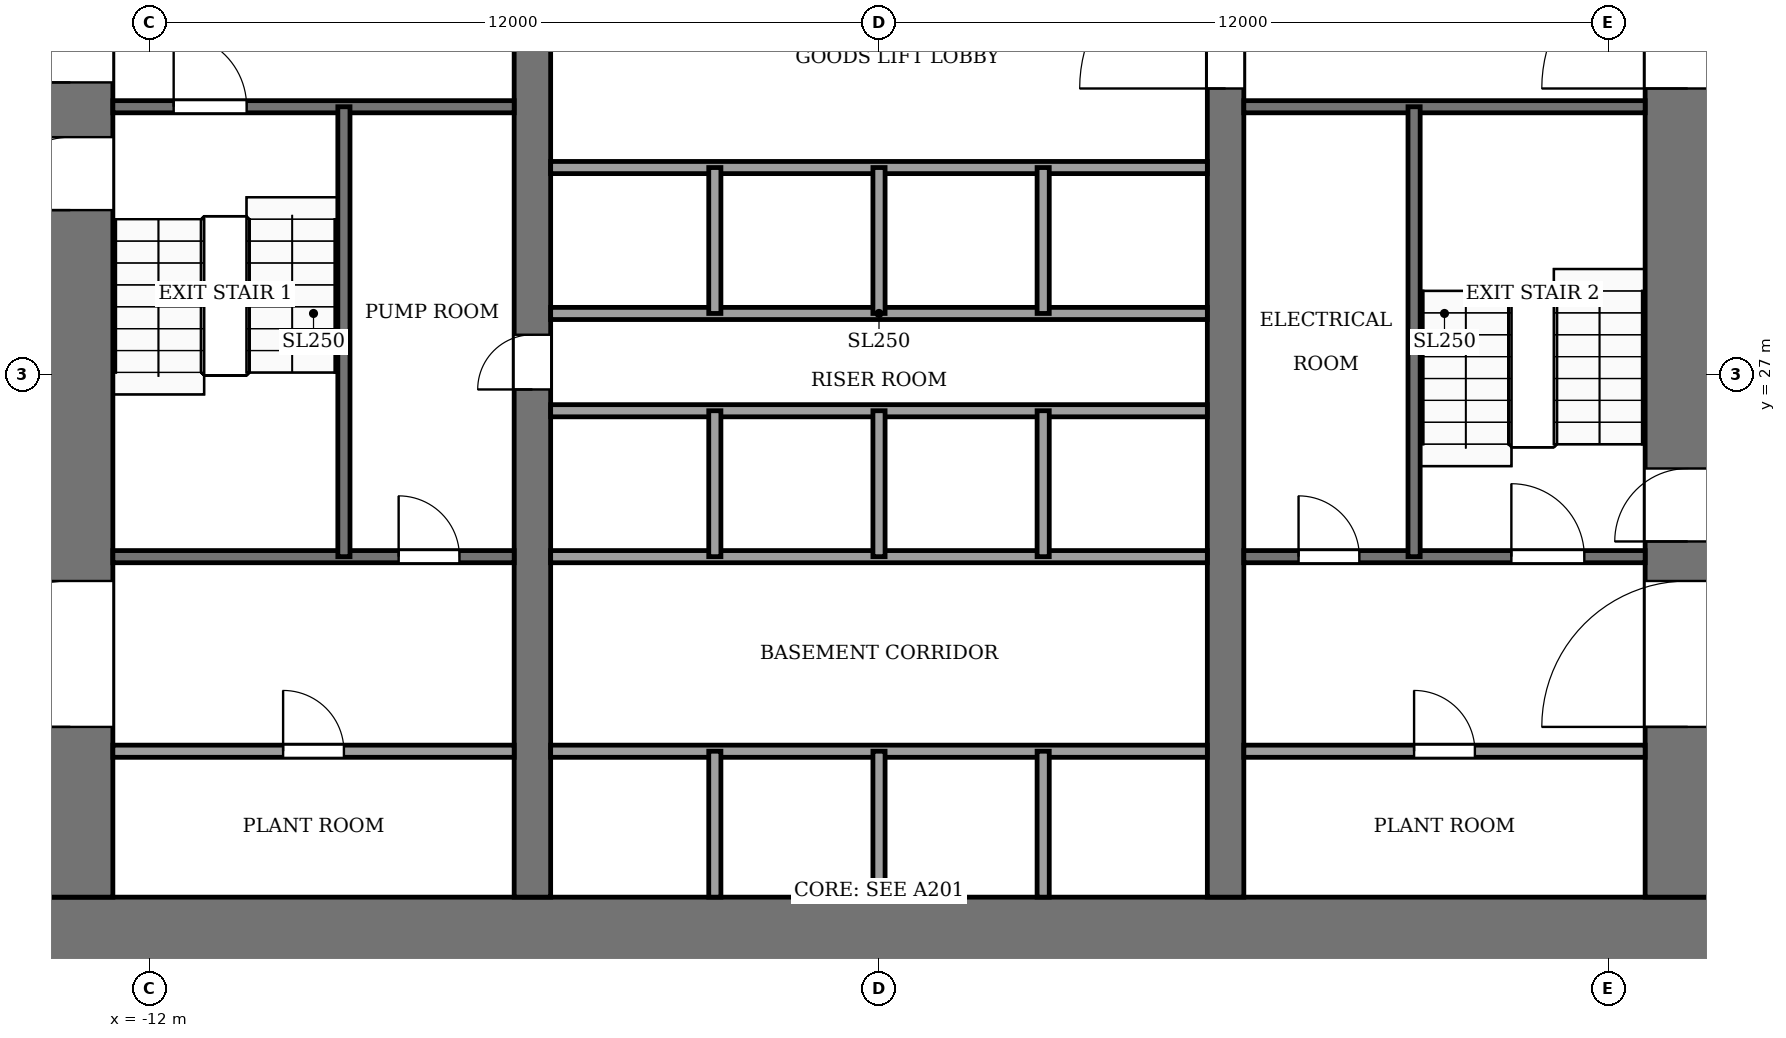
"""IFC4 building model, lengths in metres.
Left out: names, types, materials, properties, quantities, classifications, styles, units other than length and angle.
Written with IfcOpenShell. Run it as: python <this file> out.ifc"""

import sys

from ifc_helpers import new_model, si_unit, direction, frame, frame_2d, origin, place, context, subcontext, project, spatial, rectangle, extrude, element, fill, save


model = new_model("IFC4")
c1 = context("Model", 3, precision=1e-05, world=origin(), true_north=direction((0.0, 1.0)))
c2 = subcontext(c1, "Body", "Model", "MODEL_VIEW")
j1 = project(units=[si_unit("LENGTHUNIT", "METRE"), si_unit("PLANEANGLEUNIT", "RADIAN")], contexts=[c1])
p1 = place(None, origin())
s1 = spatial("IfcSite", under=j1, at=p1, CompositionType="ELEMENT")
p2 = place(p1, origin())
s2 = spatial("IfcBuilding", under=s1, at=p2, CompositionType="ELEMENT")
p3 = place(p2, frame((0.0, 0.0, -6.0)))
s3 = spatial("IfcBuildingStorey", under=s2, at=p3, CompositionType="ELEMENT", Elevation=-6.0)
p4 = place(p3, frame((-14.0, 17.7, 0.0), z_axis=(0.0, 0.0, 1.0), x_axis=(1.0, 0.0, 0.0)))
e1 = element("IfcWall", 1, at=p4, inside=s3, PredefinedType="SHEAR", context=c2, shape_type="SweptSolid", body=[
    extrude(rectangle(XDim=28.0, YDim=1.4, at=frame_2d((14.0, 0.0))), origin(), (0.0, 0.0, 1.0), 5.55),
])
p5 = place(p3, frame((-13.3, 18.4, 0.0), z_axis=(0.0, 0.0, 1.0), x_axis=(0.0, 1.0, 0.0)))
e2 = element("IfcWall", 2, at=p5, inside=s3, PredefinedType="SHEAR", context=c2, shape_type="SweptSolid", body=[
    extrude(rectangle(XDim=19.2, YDim=1.4, at=frame_2d((9.6, 0.0))), origin(), (0.0, 0.0, 1.0), 5.55),
])
p6 = place(p5, frame((2.8, 0.0, 0.0)))
e3 = element("IfcOpeningElement", 3, at=p6, cuts=e2, PredefinedType="OPENING", context=c2, shape_type="SweptSolid", body=[
    extrude(rectangle(XDim=2.4, YDim=2.4, at=frame_2d((1.2, 1.2))), frame((0.0, 0.71, 0.0), z_axis=(0.0, -1.0, 0.0), x_axis=(1.0, 0.0, 0.0)), (0.0, 0.0, 1.0), 1.42),
])
p7 = place(p5, frame((13.4, 0.0, 0.0)))
e4 = element("IfcOpeningElement", 4, at=p7, cuts=e2, PredefinedType="OPENING", context=c2, shape_type="SweptSolid", body=[
    extrude(rectangle(XDim=1.4, YDim=2.2, at=frame_2d((0.7, 1.1))), frame((0.0, 0.71, 0.0), z_axis=(0.0, -1.0, 0.0), x_axis=(1.0, 0.0, 0.0)), (0.0, 0.0, 1.0), 1.42),
])
p8 = place(p5, frame((11.3, 0.0, 0.0)))
e5 = element("IfcOpeningElement", 5, at=p8, cuts=e2, PredefinedType="OPENING", context=c2, shape_type="SweptSolid", body=[
    extrude(rectangle(XDim=1.2, YDim=2.2, at=frame_2d((0.6, 1.1))), frame((0.0, 0.71, 0.0), z_axis=(0.0, -1.0, 0.0), x_axis=(1.0, 0.0, 0.0)), (0.0, 0.0, 1.0), 1.42),
])
p9 = place(p3, frame((13.3, 18.4, 0.0), z_axis=(0.0, 0.0, 1.0), x_axis=(0.0, 1.0, 0.0)))
e6 = element("IfcWall", 6, at=p9, inside=s3, PredefinedType="SHEAR", context=c2, shape_type="SweptSolid", body=[
    extrude(rectangle(XDim=19.2, YDim=1.4, at=frame_2d((9.6, 0.0))), origin(), (0.0, 0.0, 1.0), 5.55),
])
p10 = place(p9, frame((2.8, 0.0, 0.0)))
e7 = element("IfcOpeningElement", 7, at=p10, cuts=e6, PredefinedType="OPENING", context=c2, shape_type="SweptSolid", body=[
    extrude(rectangle(XDim=2.4, YDim=2.4, at=frame_2d((1.2, 1.2))), frame((0.0, 0.71, 0.0), z_axis=(0.0, -1.0, 0.0), x_axis=(1.0, 0.0, 0.0)), (0.0, 0.0, 1.0), 1.42),
])
p11 = place(p9, frame((13.3, 0.0, 0.0)))
e8 = element("IfcOpeningElement", 8, at=p11, cuts=e6, PredefinedType="OPENING", context=c2, shape_type="SweptSolid", body=[
    extrude(rectangle(XDim=2.4, YDim=2.4, at=frame_2d((1.2, 1.2))), frame((0.0, 0.71, 0.0), z_axis=(0.0, -1.0, 0.0), x_axis=(1.0, 0.0, 0.0)), (0.0, 0.0, 1.0), 1.42),
])
p12 = place(p9, frame((5.85, 0.0, 0.0)))
e9 = element("IfcOpeningElement", 9, at=p12, cuts=e6, PredefinedType="OPENING", context=c2, shape_type="SweptSolid", body=[
    extrude(rectangle(XDim=1.2, YDim=2.2, at=frame_2d((0.6, 1.1))), frame((0.0, 0.71, 0.0), z_axis=(0.0, -1.0, 0.0), x_axis=(1.0, 0.0, 0.0)), (0.0, 0.0, 1.0), 1.42),
])
p13 = place(p9, frame((16.8, 0.0, 0.0)))
e10 = element("IfcOpeningElement", 10, at=p13, cuts=e6, PredefinedType="OPENING", context=c2, shape_type="SweptSolid", body=[
    extrude(rectangle(XDim=1.2, YDim=2.2, at=frame_2d((0.6, 1.1))), frame((0.0, 0.71, 0.0), z_axis=(0.0, -1.0, 0.0), x_axis=(1.0, 0.0, 0.0)), (0.0, 0.0, 1.0), 1.42),
])
p14 = place(p3, frame((-5.7, 18.4, 0.0), z_axis=(0.0, 0.0, 1.0), x_axis=(0.0, 1.0, 0.0)))
e11 = element("IfcWall", 11, at=p14, inside=s3, PredefinedType="SHEAR", context=c2, shape_type="SweptSolid", body=[
    extrude(rectangle(XDim=19.2, YDim=0.6, at=frame_2d((9.6, 0.0))), origin(), (0.0, 0.0, 1.0), 5.55),
])
p15 = place(p14, frame((8.35, 0.0, 0.0)))
e12 = element("IfcOpeningElement", 12, at=p15, cuts=e11, PredefinedType="OPENING", context=c2, shape_type="SweptSolid", body=[
    extrude(rectangle(XDim=0.9, YDim=2.1, at=frame_2d((0.45, 1.05))), frame((0.0, 0.31, 0.0), z_axis=(0.0, -1.0, 0.0), x_axis=(1.0, 0.0, 0.0)), (0.0, 0.0, 1.0), 0.62),
])
p16 = place(p3, frame((5.7, 18.4, 0.0), z_axis=(0.0, 0.0, 1.0), x_axis=(0.0, 1.0, 0.0)))
e13 = element("IfcWall", 13, at=p16, inside=s3, PredefinedType="SHEAR", context=c2, shape_type="SweptSolid", body=[
    extrude(rectangle(XDim=19.2, YDim=0.6, at=frame_2d((9.6, 0.0))), origin(), (0.0, 0.0, 1.0), 5.55),
])
p17 = place(p16, frame((13.3, 0.0, 0.0)))
e14 = element("IfcOpeningElement", 14, at=p17, cuts=e13, PredefinedType="OPENING", context=c2, shape_type="SweptSolid", body=[
    extrude(rectangle(XDim=2.4, YDim=2.4, at=frame_2d((1.2, 1.2))), frame((0.0, 0.31, 0.0), z_axis=(0.0, -1.0, 0.0), x_axis=(1.0, 0.0, 0.0)), (0.0, 0.0, 1.0), 0.62),
])
p18 = place(p3, frame((-12.6, 20.8, 0.0), z_axis=(0.0, 0.0, 1.0), x_axis=(1.0, 0.0, 0.0)))
e15 = element("IfcWall", 15, at=p18, inside=s3, PredefinedType="PARTITIONING", context=c2, shape_type="SweptSolid", body=[
    extrude(rectangle(XDim=6.6, YDim=0.2, at=frame_2d((3.3, 0.0))), origin(), (0.0, 0.0, 1.0), 5.55),
])
p19 = place(p18, frame((2.8, 0.0, 0.0)))
e16 = element("IfcOpeningElement", 16, at=p19, cuts=e15, PredefinedType="OPENING", context=c2, shape_type="SweptSolid", body=[
    extrude(rectangle(XDim=1.0, YDim=2.1, at=frame_2d((0.5, 1.05))), frame((0.0, 0.11, 0.0), z_axis=(0.0, -1.0, 0.0), x_axis=(1.0, 0.0, 0.0)), (0.0, 0.0, 1.0), 0.22),
])
p20 = place(p3, frame((-5.4, 20.8, 0.0), z_axis=(0.0, 0.0, 1.0), x_axis=(1.0, 0.0, 0.0)))
e17 = element("IfcWall", 17, at=p20, inside=s3, PredefinedType="PARTITIONING", context=c2, shape_type="SweptSolid", body=[
    extrude(rectangle(XDim=10.8, YDim=0.2, at=frame_2d((5.4, 0.0))), origin(), (0.0, 0.0, 1.0), 5.55),
])
p21 = place(p3, frame((6.0, 20.8, 0.0), z_axis=(0.0, 0.0, 1.0), x_axis=(1.0, 0.0, 0.0)))
e18 = element("IfcWall", 18, at=p21, inside=s3, PredefinedType="PARTITIONING", context=c2, shape_type="SweptSolid", body=[
    extrude(rectangle(XDim=6.6, YDim=0.2, at=frame_2d((3.3, 0.0))), origin(), (0.0, 0.0, 1.0), 5.55),
])
p22 = place(p21, frame((2.8, 0.0, 0.0)))
e19 = element("IfcOpeningElement", 19, at=p22, cuts=e18, PredefinedType="OPENING", context=c2, shape_type="SweptSolid", body=[
    extrude(rectangle(XDim=1.0, YDim=2.1, at=frame_2d((0.5, 1.05))), frame((0.0, 0.11, 0.0), z_axis=(0.0, -1.0, 0.0), x_axis=(1.0, 0.0, 0.0)), (0.0, 0.0, 1.0), 0.22),
])
p23 = place(p3, frame((-12.6, 24.0, 0.0), z_axis=(0.0, 0.0, 1.0), x_axis=(1.0, 0.0, 0.0)))
e20 = element("IfcWall", 20, at=p23, inside=s3, PredefinedType="PARTITIONING", context=c2, shape_type="SweptSolid", body=[
    extrude(rectangle(XDim=6.6, YDim=0.2, at=frame_2d((3.3, 0.0))), origin(), (0.0, 0.0, 1.0), 5.55),
])
p24 = place(p23, frame((4.7, 0.0, 0.0)))
e21 = element("IfcOpeningElement", 21, at=p24, cuts=e20, PredefinedType="OPENING", context=c2, shape_type="SweptSolid", body=[
    extrude(rectangle(XDim=1.0, YDim=2.1, at=frame_2d((0.5, 1.05))), frame((0.0, 0.11, 0.0), z_axis=(0.0, -1.0, 0.0), x_axis=(1.0, 0.0, 0.0)), (0.0, 0.0, 1.0), 0.22),
])
p25 = place(p3, frame((-5.4, 24.0, 0.0), z_axis=(0.0, 0.0, 1.0), x_axis=(1.0, 0.0, 0.0)))
e22 = element("IfcWall", 22, at=p25, inside=s3, PredefinedType="PARTITIONING", context=c2, shape_type="SweptSolid", body=[
    extrude(rectangle(XDim=10.8, YDim=0.2, at=frame_2d((5.4, 0.0))), origin(), (0.0, 0.0, 1.0), 5.55),
])
p26 = place(p3, frame((6.0, 24.0, 0.0), z_axis=(0.0, 0.0, 1.0), x_axis=(1.0, 0.0, 0.0)))
e23 = element("IfcWall", 23, at=p26, inside=s3, PredefinedType="PARTITIONING", context=c2, shape_type="SweptSolid", body=[
    extrude(rectangle(XDim=6.6, YDim=0.2, at=frame_2d((3.3, 0.0))), origin(), (0.0, 0.0, 1.0), 5.55),
])
p27 = place(p26, frame((0.9, 0.0, 0.0)))
e24 = element("IfcOpeningElement", 24, at=p27, cuts=e23, PredefinedType="OPENING", context=c2, shape_type="SweptSolid", body=[
    extrude(rectangle(XDim=1.0, YDim=2.1, at=frame_2d((0.5, 1.05))), frame((0.0, 0.11, 0.0), z_axis=(0.0, -1.0, 0.0), x_axis=(1.0, 0.0, 0.0)), (0.0, 0.0, 1.0), 0.22),
])
p28 = place(p26, frame((4.4, 0.0, 0.0)))
e25 = element("IfcOpeningElement", 25, at=p28, cuts=e23, PredefinedType="OPENING", context=c2, shape_type="SweptSolid", body=[
    extrude(rectangle(XDim=1.2, YDim=2.2, at=frame_2d((0.6, 1.1))), frame((0.0, 0.11, 0.0), z_axis=(0.0, -1.0, 0.0), x_axis=(1.0, 0.0, 0.0)), (0.0, 0.0, 1.0), 0.22),
])
for number, where, z_axis, x_axis in (
    (26, (-5.4, 26.4, 0.0), (0.0, 0.0, 1.0), (1.0, 0.0, 0.0)),
    (27, (-5.4, 28.0, 0.0), (0.0, 0.0, 1.0), (1.0, 0.0, 0.0)),
    (28, (-5.4, 30.4, 0.0), (0.0, 0.0, 1.0), (1.0, 0.0, 0.0)),
):
    element("IfcWall", number, at=place(p3, frame(where, z_axis=z_axis, x_axis=x_axis)), inside=s3, PredefinedType="PARTITIONING", context=c2, shape_type="SweptSolid", body=[
        extrude(rectangle(XDim=10.8, YDim=0.2, at=frame_2d((5.4, 0.0))), origin(), (0.0, 0.0, 1.0), 5.55),
    ])
p29 = place(p3, frame((-12.6, 31.4, 0.0), z_axis=(0.0, 0.0, 1.0), x_axis=(1.0, 0.0, 0.0)))
e29 = element("IfcWall", 29, at=p29, inside=s3, PredefinedType="PARTITIONING", context=c2, shape_type="SweptSolid", body=[
    extrude(rectangle(XDim=6.6, YDim=0.2, at=frame_2d((3.3, 0.0))), origin(), (0.0, 0.0, 1.0), 5.55),
])
p30 = place(p29, frame((1.0, 0.0, 0.0)))
e30 = element("IfcOpeningElement", 30, at=p30, cuts=e29, PredefinedType="OPENING", context=c2, shape_type="SweptSolid", body=[
    extrude(rectangle(XDim=1.2, YDim=2.2, at=frame_2d((0.6, 1.1))), frame((0.0, 0.11, 0.0), z_axis=(0.0, -1.0, 0.0), x_axis=(1.0, 0.0, 0.0)), (0.0, 0.0, 1.0), 0.22),
])
p31 = place(p3, frame((6.0, 31.4, 0.0), z_axis=(0.0, 0.0, 1.0), x_axis=(1.0, 0.0, 0.0)))
e31 = element("IfcWall", 31, at=p31, inside=s3, PredefinedType="PARTITIONING", context=c2, shape_type="SweptSolid", body=[
    extrude(rectangle(XDim=6.6, YDim=0.2, at=frame_2d((3.3, 0.0))), origin(), (0.0, 0.0, 1.0), 5.55),
])
p32 = place(p3, frame((-8.8, 24.0, 0.0), z_axis=(0.0, 0.0, 1.0), x_axis=(0.0, 1.0, 0.0)))
e32 = element("IfcWall", 32, at=p32, inside=s3, PredefinedType="PARTITIONING", context=c2, shape_type="SweptSolid", body=[
    extrude(rectangle(XDim=7.4, YDim=0.2, at=frame_2d((3.7, 0.0))), origin(), (0.0, 0.0, 1.0), 5.55),
])
p33 = place(p3, frame((-2.7, 18.4, 0.0), z_axis=(0.0, 0.0, 1.0), x_axis=(0.0, 1.0, 0.0)))
e33 = element("IfcWall", 33, at=p33, inside=s3, PredefinedType="PARTITIONING", context=c2, shape_type="SweptSolid", body=[
    extrude(rectangle(XDim=2.4, YDim=0.2, at=frame_2d((1.2, 0.0))), origin(), (0.0, 0.0, 1.0), 5.55),
])
for number, where, z_axis, x_axis in (
    (34, (-2.7, 24.0, 0.0), (0.0, 0.0, 1.0), (0.0, 1.0, 0.0)),
    (35, (-2.7, 28.0, 0.0), (0.0, 0.0, 1.0), (0.0, 1.0, 0.0)),
):
    element("IfcWall", number, at=place(p3, frame(where, z_axis=z_axis, x_axis=x_axis)), inside=s3, PredefinedType="PARTITIONING", context=c2, shape_type="SweptSolid", body=[
        extrude(rectangle(XDim=2.4, YDim=0.2, at=frame_2d((1.2, 0.0))), origin(), (0.0, 0.0, 1.0), 5.55),
    ])
p34 = place(p3, frame((0.0, 18.4, 0.0), z_axis=(0.0, 0.0, 1.0), x_axis=(0.0, 1.0, 0.0)))
e36 = element("IfcWall", 36, at=p34, inside=s3, PredefinedType="PARTITIONING", context=c2, shape_type="SweptSolid", body=[
    extrude(rectangle(XDim=2.4, YDim=0.2, at=frame_2d((1.2, 0.0))), origin(), (0.0, 0.0, 1.0), 5.55),
])
for number, where, z_axis, x_axis in (
    (37, (0.0, 24.0, 0.0), (0.0, 0.0, 1.0), (0.0, 1.0, 0.0)),
    (38, (0.0, 28.0, 0.0), (0.0, 0.0, 1.0), (0.0, 1.0, 0.0)),
):
    element("IfcWall", number, at=place(p3, frame(where, z_axis=z_axis, x_axis=x_axis)), inside=s3, PredefinedType="PARTITIONING", context=c2, shape_type="SweptSolid", body=[
        extrude(rectangle(XDim=2.4, YDim=0.2, at=frame_2d((1.2, 0.0))), origin(), (0.0, 0.0, 1.0), 5.55),
    ])
p35 = place(p3, frame((2.7, 18.4, 0.0), z_axis=(0.0, 0.0, 1.0), x_axis=(0.0, 1.0, 0.0)))
e39 = element("IfcWall", 39, at=p35, inside=s3, PredefinedType="PARTITIONING", context=c2, shape_type="SweptSolid", body=[
    extrude(rectangle(XDim=2.4, YDim=0.2, at=frame_2d((1.2, 0.0))), origin(), (0.0, 0.0, 1.0), 5.55),
])
for number, where, z_axis, x_axis in (
    (40, (2.7, 24.0, 0.0), (0.0, 0.0, 1.0), (0.0, 1.0, 0.0)),
    (41, (2.7, 28.0, 0.0), (0.0, 0.0, 1.0), (0.0, 1.0, 0.0)),
):
    element("IfcWall", number, at=place(p3, frame(where, z_axis=z_axis, x_axis=x_axis)), inside=s3, PredefinedType="PARTITIONING", context=c2, shape_type="SweptSolid", body=[
        extrude(rectangle(XDim=2.4, YDim=0.2, at=frame_2d((1.2, 0.0))), origin(), (0.0, 0.0, 1.0), 5.55),
    ])
p36 = place(p3, frame((8.8, 24.0, 0.0), z_axis=(0.0, 0.0, 1.0), x_axis=(0.0, 1.0, 0.0)))
e42 = element("IfcWall", 42, at=p36, inside=s3, PredefinedType="PARTITIONING", context=c2, shape_type="SweptSolid", body=[
    extrude(rectangle(XDim=7.4, YDim=0.2, at=frame_2d((3.7, 0.0))), origin(), (0.0, 0.0, 1.0), 5.55),
])
p37 = place(p19, origin())
e43 = element("IfcDoor", 43, at=p37, inside=s3, OperationType="SINGLE_SWING_LEFT", PredefinedType="DOOR", context=c2, shape_type="SweptSolid", body=[
    extrude(rectangle(XDim=1.0, YDim=2.1, at=frame_2d((0.5, 1.05))), frame((0.0, 0.025, 0.0), z_axis=(0.0, -1.0, 0.0), x_axis=(1.0, 0.0, 0.0)), (0.0, 0.0, 1.0), 0.05),
])
fill(e16, e43)
p38 = place(p22, origin())
e44 = element("IfcDoor", 44, at=p38, inside=s3, OperationType="SINGLE_SWING_RIGHT", PredefinedType="DOOR", context=c2, shape_type="SweptSolid", body=[
    extrude(rectangle(XDim=1.0, YDim=2.1, at=frame_2d((0.5, 1.05))), frame((0.0, 0.025, 0.0), z_axis=(0.0, -1.0, 0.0), x_axis=(1.0, 0.0, 0.0)), (0.0, 0.0, 1.0), 0.05),
])
fill(e19, e44)
p39 = place(p24, origin())
e45 = element("IfcDoor", 45, at=p39, inside=s3, OperationType="SINGLE_SWING_RIGHT", PredefinedType="DOOR", context=c2, shape_type="SweptSolid", body=[
    extrude(rectangle(XDim=1.0, YDim=2.1, at=frame_2d((0.5, 1.05))), frame((0.0, 0.025, 0.0), z_axis=(0.0, -1.0, 0.0), x_axis=(1.0, 0.0, 0.0)), (0.0, 0.0, 1.0), 0.05),
])
fill(e21, e45)
p40 = place(p27, origin())
e46 = element("IfcDoor", 46, at=p40, inside=s3, OperationType="SINGLE_SWING_LEFT", PredefinedType="DOOR", context=c2, shape_type="SweptSolid", body=[
    extrude(rectangle(XDim=1.0, YDim=2.1, at=frame_2d((0.5, 1.05))), frame((0.0, 0.025, 0.0), z_axis=(0.0, -1.0, 0.0), x_axis=(1.0, 0.0, 0.0)), (0.0, 0.0, 1.0), 0.05),
])
fill(e24, e46)
p41 = place(p15, origin())
e47 = element("IfcDoor", 47, at=p41, inside=s3, OperationType="SINGLE_SWING_RIGHT", PredefinedType="DOOR", context=c2, shape_type="SweptSolid", body=[
    extrude(rectangle(XDim=0.9, YDim=2.1, at=frame_2d((0.45, 1.05))), frame((0.0, 0.025, 0.0), z_axis=(0.0, -1.0, 0.0), x_axis=(1.0, 0.0, 0.0)), (0.0, 0.0, 1.0), 0.05),
])
fill(e12, e47)
p42 = place(p30, origin())
e48 = element("IfcDoor", 48, at=p42, inside=s3, OperationType="SINGLE_SWING_RIGHT", PredefinedType="DOOR", context=c2, shape_type="SweptSolid", body=[
    extrude(rectangle(XDim=1.2, YDim=2.2, at=frame_2d((0.6, 1.1))), frame((0.0, 0.025, 0.0), z_axis=(0.0, -1.0, 0.0), x_axis=(1.0, 0.0, 0.0)), (0.0, 0.0, 1.0), 0.05),
])
fill(e30, e48)
p43 = place(p28, origin())
e49 = element("IfcDoor", 49, at=p43, inside=s3, OperationType="SINGLE_SWING_LEFT", PredefinedType="DOOR", context=c2, shape_type="SweptSolid", body=[
    extrude(rectangle(XDim=1.2, YDim=2.2, at=frame_2d((0.6, 1.1))), frame((0.0, 0.025, 0.0), z_axis=(0.0, -1.0, 0.0), x_axis=(1.0, 0.0, 0.0)), (0.0, 0.0, 1.0), 0.05),
])
fill(e25, e49)
p44 = place(p17, origin())
e50 = element("IfcDoor", 50, at=p44, inside=s3, OperationType="DOUBLE_DOOR_SINGLE_SWING", PredefinedType="DOOR", context=c2, shape_type="SweptSolid", body=[
    extrude(rectangle(XDim=2.4, YDim=2.4, at=frame_2d((1.2, 1.2))), frame((0.0, 0.025, 0.0), z_axis=(0.0, -1.0, 0.0), x_axis=(1.0, 0.0, 0.0)), (0.0, 0.0, 1.0), 0.05),
])
fill(e14, e50)
p45 = place(p6, origin())
e51 = element("IfcDoor", 51, at=p45, inside=s3, OperationType="DOUBLE_DOOR_SINGLE_SWING", PredefinedType="DOOR", context=c2, shape_type="SweptSolid", body=[
    extrude(rectangle(XDim=2.4, YDim=2.4, at=frame_2d((1.2, 1.2))), frame((0.0, 0.025, 0.0), z_axis=(0.0, -1.0, 0.0), x_axis=(1.0, 0.0, 0.0)), (0.0, 0.0, 1.0), 0.05),
])
fill(e3, e51)
p46 = place(p10, origin())
e52 = element("IfcDoor", 52, at=p46, inside=s3, OperationType="DOUBLE_DOOR_SINGLE_SWING", PredefinedType="DOOR", context=c2, shape_type="SweptSolid", body=[
    extrude(rectangle(XDim=2.4, YDim=2.4, at=frame_2d((1.2, 1.2))), frame((0.0, 0.025, 0.0), z_axis=(0.0, -1.0, 0.0), x_axis=(1.0, 0.0, 0.0)), (0.0, 0.0, 1.0), 0.05),
])
fill(e7, e52)
p47 = place(p11, origin())
e53 = element("IfcDoor", 53, at=p47, inside=s3, OperationType="DOUBLE_DOOR_SINGLE_SWING", PredefinedType="DOOR", context=c2, shape_type="SweptSolid", body=[
    extrude(rectangle(XDim=2.4, YDim=2.4, at=frame_2d((1.2, 1.2))), frame((0.0, 0.025, 0.0), z_axis=(0.0, -1.0, 0.0), x_axis=(1.0, 0.0, 0.0)), (0.0, 0.0, 1.0), 0.05),
])
fill(e8, e53)
p48 = place(p7, origin())
e54 = element("IfcDoor", 54, at=p48, inside=s3, OperationType="SINGLE_SWING_RIGHT", PredefinedType="DOOR", context=c2, shape_type="SweptSolid", body=[
    extrude(rectangle(XDim=1.4, YDim=2.2, at=frame_2d((0.7, 1.1))), frame((0.0, 0.025, 0.0), z_axis=(0.0, -1.0, 0.0), x_axis=(1.0, 0.0, 0.0)), (0.0, 0.0, 1.0), 0.05),
])
fill(e4, e54)
p49 = place(p8, origin())
e55 = element("IfcDoor", 55, at=p49, inside=s3, OperationType="SINGLE_SWING_LEFT", PredefinedType="DOOR", context=c2, shape_type="SweptSolid", body=[
    extrude(rectangle(XDim=1.2, YDim=2.2, at=frame_2d((0.6, 1.1))), frame((0.0, 0.025, 0.0), z_axis=(0.0, -1.0, 0.0), x_axis=(1.0, 0.0, 0.0)), (0.0, 0.0, 1.0), 0.05),
])
fill(e5, e55)
p50 = place(p12, origin())
e56 = element("IfcDoor", 56, at=p50, inside=s3, OperationType="SINGLE_SWING_LEFT", PredefinedType="DOOR", context=c2, shape_type="SweptSolid", body=[
    extrude(rectangle(XDim=1.2, YDim=2.2, at=frame_2d((0.6, 1.1))), frame((0.0, 0.025, 0.0), z_axis=(0.0, -1.0, 0.0), x_axis=(1.0, 0.0, 0.0)), (0.0, 0.0, 1.0), 0.05),
])
fill(e9, e56)
save(model, sys.argv[1])
